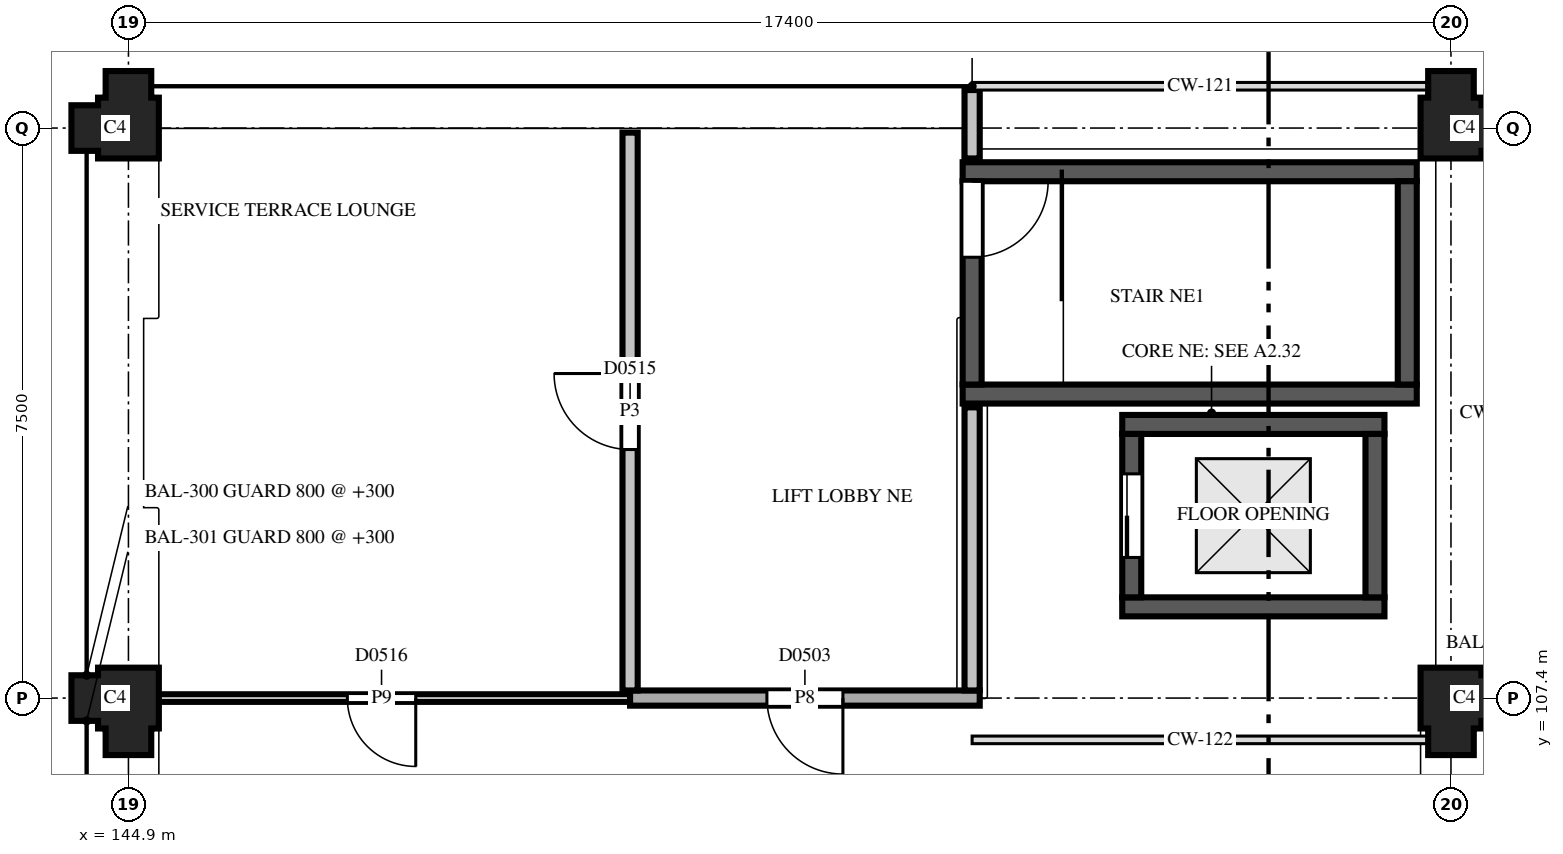
"""IFC4 building model, lengths in metres.
Left out: names, types, materials, properties, quantities, classifications, styles, units other than length and angle.
Written with IfcOpenShell. Run it as: python <this file> out.ifc"""

import sys

from ifc_helpers import new_model, si_unit, direction, frame, frame_2d, origin, place, context, subcontext, project, spatial, polyline, rectangle, outline, extrude, element, fill, save


model = new_model("IFC4")
c1 = context("Model", 3, precision=1e-05, world=origin(), true_north=direction((0.0, 1.0)))
c2 = subcontext(c1, "Body", "Model", "MODEL_VIEW")
j1 = project(units=[si_unit("LENGTHUNIT", "METRE"), si_unit("PLANEANGLEUNIT", "RADIAN")], contexts=[c1])
p1 = place(None, origin())
s1 = spatial("IfcSite", under=j1, at=p1, CompositionType="ELEMENT")
p2 = place(p1, origin())
s2 = spatial("IfcBuilding", under=s1, at=p2, CompositionType="ELEMENT")
p3 = place(p2, frame((0.0, 0.0, 19.3)))
s3 = spatial("IfcBuildingStorey", under=s2, at=p3, CompositionType="ELEMENT", Elevation=19.3)
for number, where, z_axis, x_axis in (
    (1, (144.9, 107.4, 0.0), (0.0, 0.0, 1.0), (-1.0, 0.0, 0.0)),
    (2, (162.3, 107.4, 0.0), (0.0, 0.0, 1.0), (0.0, -1.0, 0.0)),
    (3, (144.9, 114.9, 0.0), (0.0, 0.0, 1.0), (0.0, 1.0, 0.0)),
    (4, (162.3, 114.9, 0.0), (0.0, 0.0, 1.0), (1.0, 0.0, 0.0)),
):
    element("IfcColumn", number, at=place(p3, frame(where, z_axis=z_axis, x_axis=x_axis)), inside=s3, PredefinedType="COLUMN", context=c2, shape_type="SweptSolid", body=[
        extrude(outline(polyline([(-0.4, -0.4), (0.4, -0.4), (0.4, -0.3), (0.75, -0.3), (0.75, 0.3), (0.4, 0.3), (0.4, 0.4), (0.3, 0.4), (0.3, 0.75), (-0.3, 0.75), (-0.3, 0.4), (-0.4, 0.4), (-0.4, -0.4)])), origin(), (0.0, 0.0, 1.0), 3.7),
    ])
for number, where, z_axis, x_axis in (
    (5, (157.975, 108.6, 0.0), (0.0, 0.0, 1.0), (1.0, 0.0, 0.0)),
    (6, (157.975, 111.0, 0.0), (0.0, 0.0, 1.0), (1.0, 0.0, 0.0)),
):
    element("IfcWall", number, at=place(p3, frame(where, z_axis=z_axis, x_axis=x_axis)), inside=s3, PredefinedType="SHEAR", context=c2, shape_type="SweptSolid", body=[
        extrude(rectangle(XDim=3.45, YDim=0.25, at=frame_2d((1.725, 0.0))), origin(), (0.0, 0.0, 1.0), 3.35),
    ])
for number, where, z_axis, x_axis in (
    (7, (155.875, 111.4, 0.0), (0.0, 0.0, 1.0), (1.0, 0.0, 0.0)),
    (8, (155.875, 114.325, 0.0), (0.0, 0.0, 1.0), (1.0, 0.0, 0.0)),
):
    element("IfcWall", number, at=place(p3, frame(where, z_axis=z_axis, x_axis=x_axis)), inside=s3, PredefinedType="SHEAR", context=c2, shape_type="SweptSolid", body=[
        extrude(rectangle(XDim=5.975, YDim=0.25, at=frame_2d((2.988, 0.0))), origin(), (0.0, 0.0, 1.0), 3.35),
    ])
p4 = place(p3, frame((156.0, 111.525, 0.0), z_axis=(0.0, 0.0, 1.0), x_axis=(0.0, 1.0, 0.0)))
e9 = element("IfcWall", 9, at=p4, inside=s3, PredefinedType="SHEAR", context=c2, shape_type="SweptSolid", body=[
    extrude(rectangle(XDim=2.675, YDim=0.25, at=frame_2d((1.337, 0.0))), origin(), (0.0, 0.0, 1.0), 3.35),
])
p5 = place(p4, frame((1.675, 0.0, 0.0)))
e10 = element("IfcOpeningElement", 10, at=p5, cuts=e9, PredefinedType="OPENING", context=c2, shape_type="SweptSolid", body=[
    extrude(rectangle(XDim=1.0, YDim=2.1, at=frame_2d((0.5, 1.05))), frame((0.0, 0.135, 0.0), z_axis=(0.0, -1.0, 0.0), x_axis=(1.0, 0.0, 0.0)), (0.0, 0.0, 1.0), 0.27),
])
p6 = place(p3, frame((158.1, 108.725, 0.0), z_axis=(0.0, 0.0, 1.0), x_axis=(0.0, 1.0, 0.0)))
e11 = element("IfcWall", 11, at=p6, inside=s3, PredefinedType="SHEAR", context=c2, shape_type="SweptSolid", body=[
    extrude(rectangle(XDim=2.15, YDim=0.25, at=frame_2d((1.075, 0.0))), origin(), (0.0, 0.0, 1.0), 3.35),
])
p7 = place(p6, frame((0.525, 0.0, 0.0)))
e12 = element("IfcOpeningElement", 12, at=p7, cuts=e11, PredefinedType="OPENING", context=c2, shape_type="SweptSolid", body=[
    extrude(rectangle(XDim=1.1, YDim=2.1, at=frame_2d((0.55, 1.05))), frame((0.0, 0.135, 0.0), z_axis=(0.0, -1.0, 0.0), x_axis=(1.0, 0.0, 0.0)), (0.0, 0.0, 1.0), 0.27),
])
p8 = place(p3, frame((161.3, 108.725, 0.0), z_axis=(0.0, 0.0, 1.0), x_axis=(0.0, 1.0, 0.0)))
e13 = element("IfcWall", 13, at=p8, inside=s3, PredefinedType="SHEAR", context=c2, shape_type="SweptSolid", body=[
    extrude(rectangle(XDim=2.15, YDim=0.25, at=frame_2d((1.075, 0.0))), origin(), (0.0, 0.0, 1.0), 3.35),
])
p9 = place(p3, frame((161.725, 111.525, 0.0), z_axis=(0.0, 0.0, 1.0), x_axis=(0.0, 1.0, 0.0)))
e14 = element("IfcWall", 14, at=p9, inside=s3, PredefinedType="SHEAR", context=c2, shape_type="SweptSolid", body=[
    extrude(rectangle(XDim=2.675, YDim=0.25, at=frame_2d((1.337, 0.0))), origin(), (0.0, 0.0, 1.0), 3.35),
])
p10 = place(p3, frame((144.96, 107.4, 0.0), z_axis=(0.0, 0.0, 1.0), x_axis=(1.0, 0.0, 0.0)))
e15 = element("IfcWall", 15, at=p10, inside=s3, PredefinedType="PARTITIONING", context=c2, shape_type="SweptSolid", body=[
    extrude(rectangle(XDim=6.54, YDim=0.1, at=frame_2d((3.27, 0.0))), origin(), (0.0, 0.0, 1.0), 2.0),
])
p11 = place(p10, frame((2.82, 0.0, 0.0)))
e16 = element("IfcOpeningElement", 16, at=p11, cuts=e15, PredefinedType="OPENING", context=c2, shape_type="SweptSolid", body=[
    extrude(rectangle(XDim=0.9, YDim=2.0, at=frame_2d((0.45, 1.0))), frame((0.0, 0.06, 0.0), z_axis=(0.0, -1.0, 0.0), x_axis=(1.0, 0.0, 0.0)), (0.0, 0.0, 1.0), 0.12),
])
p12 = place(p3, frame((151.5, 107.4, 0.0), z_axis=(0.0, 0.0, 1.0), x_axis=(1.0, 0.0, 0.0)))
e17 = element("IfcWall", 17, at=p12, inside=s3, PredefinedType="PARTITIONING", context=c2, shape_type="SweptSolid", body=[
    extrude(rectangle(XDim=4.6, YDim=0.2, at=frame_2d((2.3, 0.0))), origin(), (0.0, 0.0, 1.0), 2.0),
])
p13 = place(p12, frame((1.8, 0.0, 0.0)))
e18 = element("IfcOpeningElement", 18, at=p13, cuts=e17, PredefinedType="OPENING", context=c2, shape_type="SweptSolid", body=[
    extrude(rectangle(XDim=1.0, YDim=2.0, at=frame_2d((0.5, 1.0))), frame((0.0, 0.11, 0.0), z_axis=(0.0, -1.0, 0.0), x_axis=(1.0, 0.0, 0.0)), (0.0, 0.0, 1.0), 0.22),
])
p14 = place(p3, frame((156.0, 107.5, 0.0), z_axis=(0.0, 0.0, 1.0), x_axis=(0.0, 1.0, 0.0)))
e19 = element("IfcWall", 19, at=p14, inside=s3, PredefinedType="PARTITIONING", context=c2, shape_type="SweptSolid", body=[
    extrude(rectangle(XDim=3.725, YDim=0.2, at=frame_2d((1.863, 0.0))), origin(), (0.0, 0.0, 1.0), 2.88),
])
p15 = place(p3, frame((156.0, 114.5, 0.0), z_axis=(0.0, 0.0, 1.0), x_axis=(0.0, 1.0, 0.0)))
e20 = element("IfcWall", 20, at=p15, inside=s3, PredefinedType="PARTITIONING", context=c2, shape_type="SweptSolid", body=[
    extrude(rectangle(XDim=0.9, YDim=0.2, at=frame_2d((0.45, 0.0))), origin(), (0.0, 0.0, 1.0), 2.88),
])
p16 = place(p3, frame((151.5, 114.84, 0.0), z_axis=(0.0, 0.0, 1.0), x_axis=(0.0, -1.0, 0.0)))
e21 = element("IfcWall", 21, at=p16, inside=s3, PredefinedType="PARTITIONING", context=c2, shape_type="SweptSolid", body=[
    extrude(rectangle(XDim=7.34, YDim=0.2, at=frame_2d((3.67, 0.0))), origin(), (0.0, 0.0, 1.0), 2.88),
])
p17 = place(p16, frame((3.17, 0.0, 0.0)))
e22 = element("IfcOpeningElement", 22, at=p17, cuts=e21, PredefinedType="OPENING", context=c2, shape_type="SweptSolid", body=[
    extrude(rectangle(XDim=1.0, YDim=2.1, at=frame_2d((0.5, 1.05))), frame((0.0, 0.11, 0.0), z_axis=(0.0, -1.0, 0.0), x_axis=(1.0, 0.0, 0.0)), (0.0, 0.0, 1.0), 0.22),
])
p18 = place(p13, frame((1.0, 0.0, 0.0), z_axis=(0.0, 0.0, 1.0), x_axis=(-1.0, 0.0, 0.0)))
e23 = element("IfcDoor", 23, at=p18, inside=s3, OperationType="SINGLE_SWING_RIGHT", PredefinedType="DOOR", context=c2, shape_type="SweptSolid", body=[
    extrude(rectangle(XDim=1.0, YDim=2.0, at=frame_2d((0.5, 1.0))), frame((0.0, 0.025, 0.0), z_axis=(0.0, -1.0, 0.0), x_axis=(1.0, 0.0, 0.0)), (0.0, 0.0, 1.0), 0.05),
])
fill(e18, e23)
p19 = place(p17, origin())
e24 = element("IfcDoor", 24, at=p19, inside=s3, OperationType="SINGLE_SWING_LEFT", PredefinedType="DOOR", context=c2, shape_type="SweptSolid", body=[
    extrude(rectangle(XDim=1.0, YDim=2.1, at=frame_2d((0.5, 1.05))), frame((0.0, 0.025, 0.0), z_axis=(0.0, -1.0, 0.0), x_axis=(1.0, 0.0, 0.0)), (0.0, 0.0, 1.0), 0.05),
])
fill(e22, e24)
p20 = place(p11, frame((0.9, 0.0, 0.0), z_axis=(0.0, 0.0, 1.0), x_axis=(-1.0, 0.0, 0.0)))
e25 = element("IfcDoor", 25, at=p20, inside=s3, OperationType="SINGLE_SWING_RIGHT", PredefinedType="DOOR", context=c2, shape_type="SweptSolid", body=[
    extrude(rectangle(XDim=0.9, YDim=2.0, at=frame_2d((0.45, 1.0))), frame((0.0, 0.025, 0.0), z_axis=(0.0, -1.0, 0.0), x_axis=(1.0, 0.0, 0.0)), (0.0, 0.0, 1.0), 0.05),
])
fill(e16, e25)
p21 = place(p7, origin())
e26 = element("IfcDoor", 26, at=p21, inside=s3, OperationType="SLIDING_TO_LEFT", PredefinedType="DOOR", context=c2, shape_type="SweptSolid", body=[
    extrude(rectangle(XDim=1.1, YDim=2.1, at=frame_2d((0.55, 1.05))), frame((0.0, 0.025, 0.0), z_axis=(0.0, -1.0, 0.0), x_axis=(1.0, 0.0, 0.0)), (0.0, 0.0, 1.0), 0.05),
])
fill(e12, e26)
p22 = place(p5, origin())
e27 = element("IfcDoor", 27, at=p22, inside=s3, OperationType="SINGLE_SWING_RIGHT", PredefinedType="DOOR", context=c2, shape_type="SweptSolid", body=[
    extrude(rectangle(XDim=1.0, YDim=2.1, at=frame_2d((0.5, 1.05))), frame((0.0, 0.025, 0.0), z_axis=(0.0, -1.0, 0.0), x_axis=(1.0, 0.0, 0.0)), (0.0, 0.0, 1.0), 0.05),
])
fill(e10, e27)
save(model, sys.argv[1])
